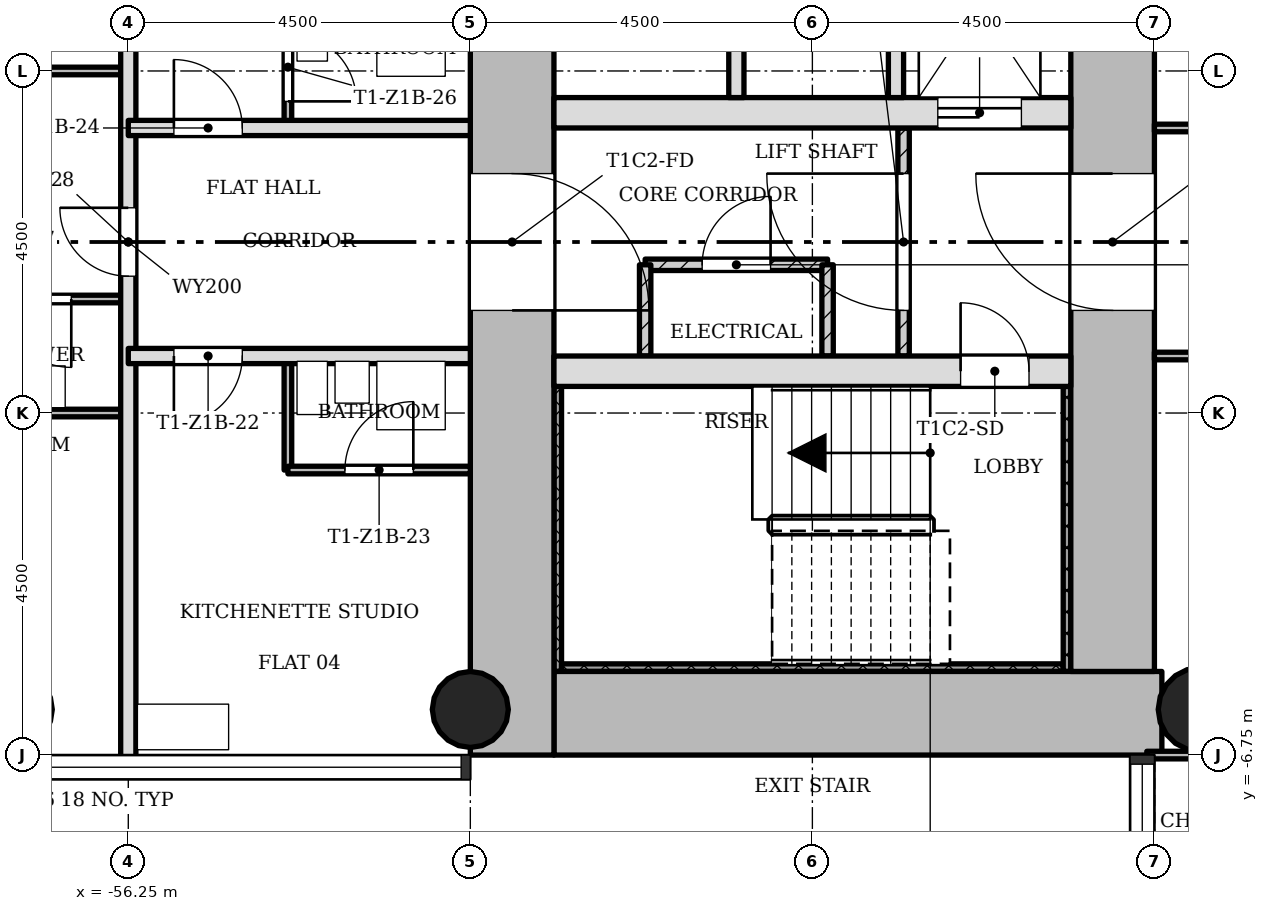
"""IFC4 building model, lengths in metres.
Left out: names, types, materials, properties, quantities, classifications, styles, units other than length and angle.
Written with IfcOpenShell. Run it as: python <this file> out.ifc"""

import sys

from ifc_helpers import new_model, si_unit, direction, frame, frame_2d, origin, origin_2d, place, context, subcontext, project, spatial, rectangle, hollow_circle, extrude, element, fill, save


model = new_model("IFC4")
c1 = context("Model", 3, precision=1e-05, world=origin(), true_north=direction((0.0, 1.0)))
c2 = subcontext(c1, "Body", "Model", "MODEL_VIEW")
j1 = project(units=[si_unit("LENGTHUNIT", "METRE"), si_unit("PLANEANGLEUNIT", "RADIAN")], contexts=[c1])
p1 = place(None, origin())
s1 = spatial("IfcSite", under=j1, at=p1, CompositionType="ELEMENT")
p2 = place(p1, origin())
s2 = spatial("IfcBuilding", under=s1, at=p2, CompositionType="ELEMENT")
p3 = place(p2, frame((0.0, 0.0, 34.7)))
s3 = spatial("IfcBuildingStorey", under=s2, at=p3, CompositionType="ELEMENT", Elevation=34.7)
p4 = place(p3, frame((-50.65, -6.2, 0.0), z_axis=(0.0, 0.0, 1.0), x_axis=(1.0, 0.0, 0.0)))
e1 = element("IfcWall", 1, at=p4, inside=s3, PredefinedType="SHEAR", context=c2, shape_type="SweptSolid", body=[
    extrude(rectangle(XDim=7.998, YDim=1.1, at=frame_2d((3.999, 0.0))), origin(), (0.0, 0.0, 1.0), 3.4),
])
p5 = place(p3, frame((-43.3, -5.65, 0.0), z_axis=(0.0, 0.0, 1.0), x_axis=(0.0, 1.0, 0.0)))
e2 = element("IfcWall", 2, at=p5, inside=s3, PredefinedType="SHEAR", context=c2, shape_type="SweptSolid", body=[
    extrude(rectangle(XDim=12.4, YDim=1.1, at=frame_2d((6.2, 0.0))), origin(), (0.0, 0.0, 1.0), 3.4),
])
p6 = place(p5, frame((4.75, 0.0, 0.0)))
e3 = element("IfcOpeningElement", 3, at=p6, cuts=e2, PredefinedType="OPENING", context=c2, shape_type="SweptSolid", body=[
    extrude(rectangle(XDim=1.8, YDim=2.1, at=frame_2d((0.9, 1.05))), frame((0.0, 0.56, 0.0), z_axis=(0.0, -1.0, 0.0), x_axis=(1.0, 0.0, 0.0)), (0.0, 0.0, 1.0), 1.12),
])
p7 = place(p3, frame((-51.2, 5.65, 0.0), z_axis=(0.0, 0.0, 1.0), x_axis=(0.0, -1.0, 0.0)))
e4 = element("IfcWall", 4, at=p7, inside=s3, PredefinedType="SHEAR", context=c2, shape_type="SweptSolid", body=[
    extrude(rectangle(XDim=12.4, YDim=1.1, at=frame_2d((6.2, 0.0))), origin(), (0.0, 0.0, 1.0), 3.4),
])
p8 = place(p7, frame((4.75, 0.0, 0.0)))
e5 = element("IfcOpeningElement", 5, at=p8, cuts=e4, PredefinedType="OPENING", context=c2, shape_type="SweptSolid", body=[
    extrude(rectangle(XDim=1.8, YDim=2.1, at=frame_2d((0.9, 1.05))), frame((0.0, 0.56, 0.0), z_axis=(0.0, -1.0, 0.0), x_axis=(1.0, 0.0, 0.0)), (0.0, 0.0, 1.0), 1.12),
])
p9 = place(p3, frame((-50.65, -1.7, 0.0), z_axis=(0.0, 0.0, 1.0), x_axis=(1.0, 0.0, 0.0)))
e6 = element("IfcWall", 6, at=p9, inside=s3, PredefinedType="SHEAR", context=c2, shape_type="SweptSolid", body=[
    extrude(rectangle(XDim=6.8, YDim=0.4, at=frame_2d((3.4, 0.0))), origin(), (0.0, 0.0, 1.0), 3.4),
])
p10 = place(p9, frame((5.35, 0.0, 0.0)))
e7 = element("IfcOpeningElement", 7, at=p10, cuts=e6, PredefinedType="OPENING", context=c2, shape_type="SweptSolid", body=[
    extrude(rectangle(XDim=0.9, YDim=2.1, at=frame_2d((0.45, 1.05))), frame((0.0, 0.21, 0.0), z_axis=(0.0, -1.0, 0.0), x_axis=(1.0, 0.0, 0.0)), (0.0, 0.0, 1.0), 0.42),
])
p11 = place(p3, frame((-50.65, 1.7, 0.0), z_axis=(0.0, 0.0, 1.0), x_axis=(1.0, 0.0, 0.0)))
e8 = element("IfcWall", 8, at=p11, inside=s3, PredefinedType="SHEAR", context=c2, shape_type="SweptSolid", body=[
    extrude(rectangle(XDim=6.8, YDim=0.4, at=frame_2d((3.4, 0.0))), origin(), (0.0, 0.0, 1.0), 3.4),
])
p12 = place(p11, frame((5.05, 0.0, 0.0)))
e9 = element("IfcOpeningElement", 9, at=p12, cuts=e8, PredefinedType="OPENING", context=c2, shape_type="SweptSolid", body=[
    extrude(rectangle(XDim=1.1, YDim=2.1, at=frame_2d((0.55, 1.05))), frame((0.0, 0.21, 0.0), z_axis=(0.0, -1.0, 0.0), x_axis=(1.0, 0.0, 0.0)), (0.0, 0.0, 1.0), 0.42),
])
p13 = place(p3, frame((-51.75, -6.15, 0.0), z_axis=(0.0, 0.0, 1.0), x_axis=(1.0, 0.0, 0.0)))
e10 = element("IfcColumn", 10, at=p13, inside=s3, PredefinedType="COLUMN", context=c2, shape_type="SweptSolid", body=[
    extrude(hollow_circle(Radius=0.5, WallThickness=0.036, at=origin_2d()), origin(), (0.0, 0.0, 1.0), 3.4),
])
p14 = place(p3, frame((-42.15, -6.15, 0.0), z_axis=(0.0, 0.0, 1.0), x_axis=(1.0, 0.0, 0.0)))
e11 = element("IfcColumn", 11, at=p14, inside=s3, PredefinedType="COLUMN", context=c2, shape_type="SweptSolid", body=[
    extrude(hollow_circle(Radius=0.55, WallThickness=0.04, at=origin_2d()), origin(), (0.0, 0.0, 1.0), 3.4),
])
p15 = place(p3, frame((-46.05, 1.5, 0.0), z_axis=(0.0, 0.0, 1.0), x_axis=(0.0, -1.0, 0.0)))
e12 = element("IfcWall", 12, at=p15, inside=s3, PredefinedType="PARTITIONING", context=c2, shape_type="SweptSolid", body=[
    extrude(rectangle(XDim=3.0, YDim=0.15, at=frame_2d((1.5, 0.0))), origin(), (0.0, 0.0, 1.0), 3.0),
])
p16 = place(p15, frame((0.6, 0.0, 0.0)))
e13 = element("IfcOpeningElement", 13, at=p16, cuts=e12, PredefinedType="OPENING", context=c2, shape_type="SweptSolid", body=[
    extrude(rectangle(XDim=1.8, YDim=2.1, at=frame_2d((0.9, 1.05))), frame((0.0, 0.085, 0.0), z_axis=(0.0, -1.0, 0.0), x_axis=(1.0, 0.0, 0.0)), (0.0, 0.0, 1.0), 0.17),
])
for number, where, z_axis, x_axis in (
    (14, (-46.15, 5.65, 0.0), (0.0, 0.0, 1.0), (0.0, -1.0, 0.0)),
    (15, (-48.25, 5.65, 0.0), (0.0, 0.0, 1.0), (0.0, -1.0, 0.0)),
):
    element("IfcWall", number, at=place(p3, frame(where, z_axis=z_axis, x_axis=x_axis)), inside=s3, PredefinedType="SOLIDWALL", context=c2, shape_type="SweptSolid", body=[
        extrude(rectangle(XDim=3.75, YDim=0.2, at=frame_2d((1.875, 0.0))), origin(), (0.0, 0.0, 1.0), 3.0),
    ])
p17 = place(p3, frame((-47.05, -0.3, 0.0), z_axis=(0.0, 0.0, 1.0), x_axis=(-1.0, 0.0, 0.0)))
e16 = element("IfcWall", 16, at=p17, inside=s3, PredefinedType="PARTITIONING", context=c2, shape_type="SweptSolid", body=[
    extrude(rectangle(XDim=2.4, YDim=0.15, at=frame_2d((1.2, 0.0))), origin(), (0.0, 0.0, 1.0), 3.0),
])
p18 = place(p17, frame((0.75, 0.0, 0.0)))
e17 = element("IfcOpeningElement", 17, at=p18, cuts=e16, PredefinedType="OPENING", context=c2, shape_type="SweptSolid", body=[
    extrude(rectangle(XDim=0.9, YDim=2.1, at=frame_2d((0.45, 1.05))), frame((0.0, 0.085, 0.0), z_axis=(0.0, -1.0, 0.0), x_axis=(1.0, 0.0, 0.0)), (0.0, 0.0, 1.0), 0.17),
])
for number, where, z_axis, x_axis in (
    (18, (-47.05, -0.3, 0.0), (0.0, 0.0, 1.0), (0.0, -1.0, 0.0)),
    (19, (-49.45, -0.3, 0.0), (0.0, 0.0, 1.0), (0.0, -1.0, 0.0)),
):
    element("IfcWall", number, at=place(p3, frame(where, z_axis=z_axis, x_axis=x_axis)), inside=s3, PredefinedType="PARTITIONING", context=c2, shape_type="SweptSolid", body=[
        extrude(rectangle(XDim=1.2, YDim=0.15, at=frame_2d((0.6, 0.0))), origin(), (0.0, 0.0, 1.0), 3.0),
    ])
p19 = place(p3, frame((-56.25, -6.85, 0.0), z_axis=(0.0, 0.0, 1.0), x_axis=(0.0, 1.0, 0.0)))
e20 = element("IfcWall", 20, at=p19, inside=s3, PredefinedType="SOLIDWALL", context=c2, shape_type="SweptSolid", body=[
    extrude(rectangle(XDim=13.7, YDim=0.2, at=frame_2d((6.85, 0.0))), origin(), (0.0, 0.0, 1.0), 3.0),
])
p20 = place(p19, frame((6.4, 0.0, 0.0)))
e21 = element("IfcOpeningElement", 21, at=p20, cuts=e20, PredefinedType="OPENING", context=c2, shape_type="SweptSolid", body=[
    extrude(rectangle(XDim=0.9, YDim=2.1, at=frame_2d((0.45, 1.05))), frame((0.0, 0.11, 0.0), z_axis=(0.0, -1.0, 0.0), x_axis=(1.0, 0.0, 0.0)), (0.0, 0.0, 1.0), 0.22),
])
p21 = place(p3, frame((-54.15, -3.0, 0.0), z_axis=(0.0, 0.0, 1.0), x_axis=(0.0, 1.0, 0.0)))
e22 = element("IfcWall", 22, at=p21, inside=s3, PredefinedType="PARTITIONING", context=c2, shape_type="SweptSolid", body=[
    extrude(rectangle(XDim=1.5, YDim=0.1, at=frame_2d((0.75, 0.0))), origin(), (0.0, 0.0, 1.0), 3.0),
])
p22 = place(p3, frame((-54.15, 1.5, 0.0), z_axis=(0.0, 0.0, 1.0), x_axis=(0.0, 1.0, 0.0)))
e23 = element("IfcWall", 23, at=p22, inside=s3, PredefinedType="PARTITIONING", context=c2, shape_type="SweptSolid", body=[
    extrude(rectangle(XDim=1.65, YDim=0.1, at=frame_2d((0.825, 0.0))), origin(), (0.0, 0.0, 1.0), 3.0),
])
p23 = place(p22, frame((0.35, 0.0, 0.0)))
e24 = element("IfcOpeningElement", 24, at=p23, cuts=e23, PredefinedType="OPENING", context=c2, shape_type="SweptSolid", body=[
    extrude(rectangle(XDim=0.9, YDim=2.1, at=frame_2d((0.45, 1.05))), frame((0.0, 0.06, 0.0), z_axis=(0.0, -1.0, 0.0), x_axis=(1.0, 0.0, 0.0)), (0.0, 0.0, 1.0), 0.12),
])
p24 = place(p3, frame((-42.85, -6.75, 0.0), z_axis=(0.0, 0.0, 1.0), x_axis=(1.0, 0.0, 0.0)))
e25 = element("IfcWall", 25, at=p24, inside=s3, PredefinedType="PARTITIONING", context=c2, shape_type="SweptSolid", body=[
    extrude(rectangle(XDim=5.95, YDim=0.1, at=frame_2d((2.975, 0.0))), origin(), (0.0, 0.0, 1.0), 3.0),
])
p25 = place(p3, frame((-54.15, -3.0, 0.0), z_axis=(0.0, 0.0, 1.0), x_axis=(1.0, 0.0, 0.0)))
e26 = element("IfcWall", 26, at=p25, inside=s3, PredefinedType="PARTITIONING", context=c2, shape_type="SweptSolid", body=[
    extrude(rectangle(XDim=2.4, YDim=0.1, at=frame_2d((1.2, 0.0))), origin(), (0.0, 0.0, 1.0), 3.0),
])
p26 = place(p25, frame((0.75, 0.0, 0.0)))
e27 = element("IfcOpeningElement", 27, at=p26, cuts=e26, PredefinedType="OPENING", context=c2, shape_type="SweptSolid", body=[
    extrude(rectangle(XDim=0.9, YDim=2.1, at=frame_2d((0.45, 1.05))), frame((0.0, 0.06, 0.0), z_axis=(0.0, -1.0, 0.0), x_axis=(1.0, 0.0, 0.0)), (0.0, 0.0, 1.0), 0.12),
])
p27 = place(p3, frame((-60.85, -2.25, 0.0), z_axis=(0.0, 0.0, 1.0), x_axis=(1.0, 0.0, 0.0)))
e28 = element("IfcWall", 28, at=p27, inside=s3, PredefinedType="PARTITIONING", context=c2, shape_type="SweptSolid", body=[
    extrude(rectangle(XDim=4.6, YDim=0.1, at=frame_2d((2.3, 0.0))), origin(), (0.0, 0.0, 1.0), 3.0),
])
p28 = place(p27, frame((1.25, 0.0, 0.0)))
e29 = element("IfcOpeningElement", 29, at=p28, cuts=e28, PredefinedType="OPENING", context=c2, shape_type="SweptSolid", body=[
    extrude(rectangle(XDim=0.9, YDim=2.1, at=frame_2d((0.45, 1.05))), frame((0.0, 0.06, 0.0), z_axis=(0.0, -1.0, 0.0), x_axis=(1.0, 0.0, 0.0)), (0.0, 0.0, 1.0), 0.12),
])
p29 = place(p3, frame((-42.75, -1.5, 0.0), z_axis=(0.0, 0.0, 1.0), x_axis=(1.0, 0.0, 0.0)))
e30 = element("IfcWall", 30, at=p29, inside=s3, PredefinedType="PARTITIONING", context=c2, shape_type="SweptSolid", body=[
    extrude(rectangle(XDim=5.85, YDim=0.1, at=frame_2d((2.925, 0.0))), origin(), (0.0, 0.0, 1.0), 3.0),
])
p30 = place(p29, frame((2.475, 0.0, 0.0)))
e31 = element("IfcOpeningElement", 31, at=p30, cuts=e30, PredefinedType="OPENING", context=c2, shape_type="SweptSolid", body=[
    extrude(rectangle(XDim=0.9, YDim=2.1, at=frame_2d((0.45, 1.05))), frame((0.0, 0.06, 0.0), z_axis=(0.0, -1.0, 0.0), x_axis=(1.0, 0.0, 0.0)), (0.0, 0.0, 1.0), 0.12),
])
p31 = place(p3, frame((-56.25, -1.5, 0.0), z_axis=(0.0, 0.0, 1.0), x_axis=(1.0, 0.0, 0.0)))
e32 = element("IfcWall", 32, at=p31, inside=s3, PredefinedType="SOLIDWALL", context=c2, shape_type="SweptSolid", body=[
    extrude(rectangle(XDim=4.5, YDim=0.2, at=frame_2d((2.25, 0.0))), origin(), (0.0, 0.0, 1.0), 3.0),
])
p32 = place(p31, frame((0.6, 0.0, 0.0)))
e33 = element("IfcOpeningElement", 33, at=p32, cuts=e32, PredefinedType="OPENING", context=c2, shape_type="SweptSolid", body=[
    extrude(rectangle(XDim=0.9, YDim=2.1, at=frame_2d((0.45, 1.05))), frame((0.0, 0.11, 0.0), z_axis=(0.0, -1.0, 0.0), x_axis=(1.0, 0.0, 0.0)), (0.0, 0.0, 1.0), 0.22),
])
p33 = place(p3, frame((-58.65, -0.75, 0.0), z_axis=(0.0, 0.0, 1.0), x_axis=(1.0, 0.0, 0.0)))
e34 = element("IfcWall", 34, at=p33, inside=s3, PredefinedType="PARTITIONING", context=c2, shape_type="SweptSolid", body=[
    extrude(rectangle(XDim=2.4, YDim=0.1, at=frame_2d((1.2, 0.0))), origin(), (0.0, 0.0, 1.0), 3.0),
])
p34 = place(p33, frame((0.75, 0.0, 0.0)))
e35 = element("IfcOpeningElement", 35, at=p34, cuts=e34, PredefinedType="OPENING", context=c2, shape_type="SweptSolid", body=[
    extrude(rectangle(XDim=0.9, YDim=2.1, at=frame_2d((0.45, 1.05))), frame((0.0, 0.06, 0.0), z_axis=(0.0, -1.0, 0.0), x_axis=(1.0, 0.0, 0.0)), (0.0, 0.0, 1.0), 0.12),
])
p35 = place(p3, frame((-42.75, 1.5, 0.0), z_axis=(0.0, 0.0, 1.0), x_axis=(1.0, 0.0, 0.0)))
e36 = element("IfcWall", 36, at=p35, inside=s3, PredefinedType="PARTITIONING", context=c2, shape_type="SweptSolid", body=[
    extrude(rectangle(XDim=5.85, YDim=0.1, at=frame_2d((2.925, 0.0))), origin(), (0.0, 0.0, 1.0), 3.0),
])
p36 = place(p35, frame((2.475, 0.0, 0.0)))
e37 = element("IfcOpeningElement", 37, at=p36, cuts=e36, PredefinedType="OPENING", context=c2, shape_type="SweptSolid", body=[
    extrude(rectangle(XDim=0.9, YDim=2.1, at=frame_2d((0.45, 1.05))), frame((0.0, 0.06, 0.0), z_axis=(0.0, -1.0, 0.0), x_axis=(1.0, 0.0, 0.0)), (0.0, 0.0, 1.0), 0.12),
])
p37 = place(p3, frame((-56.25, 1.5, 0.0), z_axis=(0.0, 0.0, 1.0), x_axis=(1.0, 0.0, 0.0)))
e38 = element("IfcWall", 38, at=p37, inside=s3, PredefinedType="SOLIDWALL", context=c2, shape_type="SweptSolid", body=[
    extrude(rectangle(XDim=4.5, YDim=0.2, at=frame_2d((2.25, 0.0))), origin(), (0.0, 0.0, 1.0), 3.0),
])
p38 = place(p37, frame((0.6, 0.0, 0.0)))
e39 = element("IfcOpeningElement", 39, at=p38, cuts=e38, PredefinedType="OPENING", context=c2, shape_type="SweptSolid", body=[
    extrude(rectangle(XDim=0.9, YDim=2.1, at=frame_2d((0.45, 1.05))), frame((0.0, 0.11, 0.0), z_axis=(0.0, -1.0, 0.0), x_axis=(1.0, 0.0, 0.0)), (0.0, 0.0, 1.0), 0.22),
])
p39 = place(p3, frame((-60.85, 2.25, 0.0), z_axis=(0.0, 0.0, 1.0), x_axis=(1.0, 0.0, 0.0)))
e40 = element("IfcWall", 40, at=p39, inside=s3, PredefinedType="PARTITIONING", context=c2, shape_type="SweptSolid", body=[
    extrude(rectangle(XDim=4.6, YDim=0.1, at=frame_2d((2.3, 0.0))), origin(), (0.0, 0.0, 1.0), 3.0),
])
p40 = place(p39, frame((1.9, 0.0, 0.0)))
e41 = element("IfcOpeningElement", 41, at=p40, cuts=e40, PredefinedType="OPENING", context=c2, shape_type="SweptSolid", body=[
    extrude(rectangle(XDim=0.9, YDim=2.1, at=frame_2d((0.45, 1.05))), frame((0.0, 0.06, 0.0), z_axis=(0.0, -1.0, 0.0), x_axis=(1.0, 0.0, 0.0)), (0.0, 0.0, 1.0), 0.12),
])
p41 = place(p3, frame((-50.6, -1.9, 0.0), z_axis=(0.0, 0.0, 1.0), x_axis=(0.0, -1.0, 0.0)))
e42 = element("IfcWall", 42, at=p41, inside=s3, PredefinedType="SHEAR", context=c2, shape_type="SweptSolid", body=[
    extrude(rectangle(XDim=3.75, YDim=0.1, at=frame_2d((1.875, 0.0))), origin(), (0.0, 0.0, 1.0), 3.4),
])
p42 = place(p3, frame((-43.95, -5.6, 0.0), z_axis=(0.0, 0.0, 1.0), x_axis=(-1.0, 0.0, 0.0)))
e43 = element("IfcWall", 43, at=p42, inside=s3, PredefinedType="SHEAR", context=c2, shape_type="SweptSolid", body=[
    extrude(rectangle(XDim=6.6, YDim=0.1, at=frame_2d((3.3, 0.0))), origin(), (0.0, 0.0, 1.0), 3.4),
])
p43 = place(p3, frame((-43.9, -1.9, 0.0), z_axis=(0.0, 0.0, 1.0), x_axis=(0.0, -1.0, 0.0)))
e44 = element("IfcWall", 44, at=p43, inside=s3, PredefinedType="SHEAR", context=c2, shape_type="SweptSolid", body=[
    extrude(rectangle(XDim=3.75, YDim=0.1, at=frame_2d((1.875, 0.0))), origin(), (0.0, 0.0, 1.0), 3.4),
])
p44 = place(p16, origin())
e45 = element("IfcDoor", 45, at=p44, inside=s3, OperationType="SINGLE_SWING_LEFT", PredefinedType="DOOR", context=c2, shape_type="SweptSolid", body=[
    extrude(rectangle(XDim=1.8, YDim=2.1, at=frame_2d((0.9, 1.05))), frame((0.0, 0.025, 0.0), z_axis=(0.0, -1.0, 0.0), x_axis=(1.0, 0.0, 0.0)), (0.0, 0.0, 1.0), 0.05),
])
fill(e13, e45)
p45 = place(p18, origin())
e46 = element("IfcDoor", 46, at=p45, inside=s3, OperationType="SINGLE_SWING_LEFT", PredefinedType="DOOR", context=c2, shape_type="SweptSolid", body=[
    extrude(rectangle(XDim=0.9, YDim=2.1, at=frame_2d((0.45, 1.05))), frame((0.0, 0.025, 0.0), z_axis=(0.0, -1.0, 0.0), x_axis=(1.0, 0.0, 0.0)), (0.0, 0.0, 1.0), 0.05),
])
fill(e17, e46)
p46 = place(p32, origin())
e47 = element("IfcDoor", 47, at=p46, inside=s3, OperationType="SINGLE_SWING_LEFT", PredefinedType="DOOR", context=c2, shape_type="SweptSolid", body=[
    extrude(rectangle(XDim=0.9, YDim=2.1, at=frame_2d((0.45, 1.05))), frame((0.0, 0.025, 0.0), z_axis=(0.0, -1.0, 0.0), x_axis=(1.0, 0.0, 0.0)), (0.0, 0.0, 1.0), 0.05),
])
fill(e33, e47)
p47 = place(p26, origin())
e48 = element("IfcDoor", 48, at=p47, inside=s3, OperationType="SINGLE_SWING_LEFT", PredefinedType="DOOR", context=c2, shape_type="SweptSolid", body=[
    extrude(rectangle(XDim=0.9, YDim=2.1, at=frame_2d((0.45, 1.05))), frame((0.0, 0.025, 0.0), z_axis=(0.0, -1.0, 0.0), x_axis=(1.0, 0.0, 0.0)), (0.0, 0.0, 1.0), 0.05),
])
fill(e27, e48)
p48 = place(p38, origin())
e49 = element("IfcDoor", 49, at=p48, inside=s3, OperationType="SINGLE_SWING_RIGHT", PredefinedType="DOOR", context=c2, shape_type="SweptSolid", body=[
    extrude(rectangle(XDim=0.9, YDim=2.1, at=frame_2d((0.45, 1.05))), frame((0.0, 0.025, 0.0), z_axis=(0.0, -1.0, 0.0), x_axis=(1.0, 0.0, 0.0)), (0.0, 0.0, 1.0), 0.05),
])
fill(e39, e49)
p49 = place(p23, origin())
e50 = element("IfcDoor", 50, at=p49, inside=s3, OperationType="SINGLE_SWING_LEFT", PredefinedType="DOOR", context=c2, shape_type="SweptSolid", body=[
    extrude(rectangle(XDim=0.9, YDim=2.1, at=frame_2d((0.45, 1.05))), frame((0.0, 0.025, 0.0), z_axis=(0.0, -1.0, 0.0), x_axis=(1.0, 0.0, 0.0)), (0.0, 0.0, 1.0), 0.05),
])
fill(e24, e50)
p50 = place(p34, origin())
e51 = element("IfcDoor", 51, at=p50, inside=s3, OperationType="SINGLE_SWING_RIGHT", PredefinedType="DOOR", context=c2, shape_type="SweptSolid", body=[
    extrude(rectangle(XDim=0.9, YDim=2.1, at=frame_2d((0.45, 1.05))), frame((0.0, 0.025, 0.0), z_axis=(0.0, -1.0, 0.0), x_axis=(1.0, 0.0, 0.0)), (0.0, 0.0, 1.0), 0.05),
])
fill(e35, e51)
p51 = place(p20, origin())
e52 = element("IfcDoor", 52, at=p51, inside=s3, OperationType="SINGLE_SWING_LEFT", PredefinedType="DOOR", context=c2, shape_type="SweptSolid", body=[
    extrude(rectangle(XDim=0.9, YDim=2.1, at=frame_2d((0.45, 1.05))), frame((0.0, 0.025, 0.0), z_axis=(0.0, -1.0, 0.0), x_axis=(1.0, 0.0, 0.0)), (0.0, 0.0, 1.0), 0.05),
])
fill(e21, e52)
p52 = place(p10, origin())
e53 = element("IfcDoor", 53, at=p52, inside=s3, OperationType="SINGLE_SWING_RIGHT", PredefinedType="DOOR", context=c2, shape_type="SweptSolid", body=[
    extrude(rectangle(XDim=0.9, YDim=2.1, at=frame_2d((0.45, 1.05))), frame((0.0, 0.025, 0.0), z_axis=(0.0, -1.0, 0.0), x_axis=(1.0, 0.0, 0.0)), (0.0, 0.0, 1.0), 0.05),
])
fill(e7, e53)
p53 = place(p12, origin())
e54 = element("IfcDoor", 54, at=p53, inside=s3, OperationType="SLIDING_TO_LEFT", PredefinedType="DOOR", context=c2, shape_type="SweptSolid", body=[
    extrude(rectangle(XDim=1.1, YDim=2.1, at=frame_2d((0.55, 1.05))), frame((0.0, 0.025, 0.0), z_axis=(0.0, -1.0, 0.0), x_axis=(1.0, 0.0, 0.0)), (0.0, 0.0, 1.0), 0.05),
])
fill(e9, e54)
p54 = place(p6, origin())
e55 = element("IfcDoor", 55, at=p54, inside=s3, OperationType="SINGLE_SWING_LEFT", PredefinedType="DOOR", context=c2, shape_type="SweptSolid", body=[
    extrude(rectangle(XDim=1.8, YDim=2.1, at=frame_2d((0.9, 1.05))), frame((0.0, 0.025, 0.0), z_axis=(0.0, -1.0, 0.0), x_axis=(1.0, 0.0, 0.0)), (0.0, 0.0, 1.0), 0.05),
])
fill(e3, e55)
p55 = place(p8, origin())
e56 = element("IfcDoor", 56, at=p55, inside=s3, OperationType="SINGLE_SWING_LEFT", PredefinedType="DOOR", context=c2, shape_type="SweptSolid", body=[
    extrude(rectangle(XDim=1.8, YDim=2.1, at=frame_2d((0.9, 1.05))), frame((0.0, 0.025, 0.0), z_axis=(0.0, -1.0, 0.0), x_axis=(1.0, 0.0, 0.0)), (0.0, 0.0, 1.0), 0.05),
])
fill(e5, e56)
save(model, sys.argv[1])
